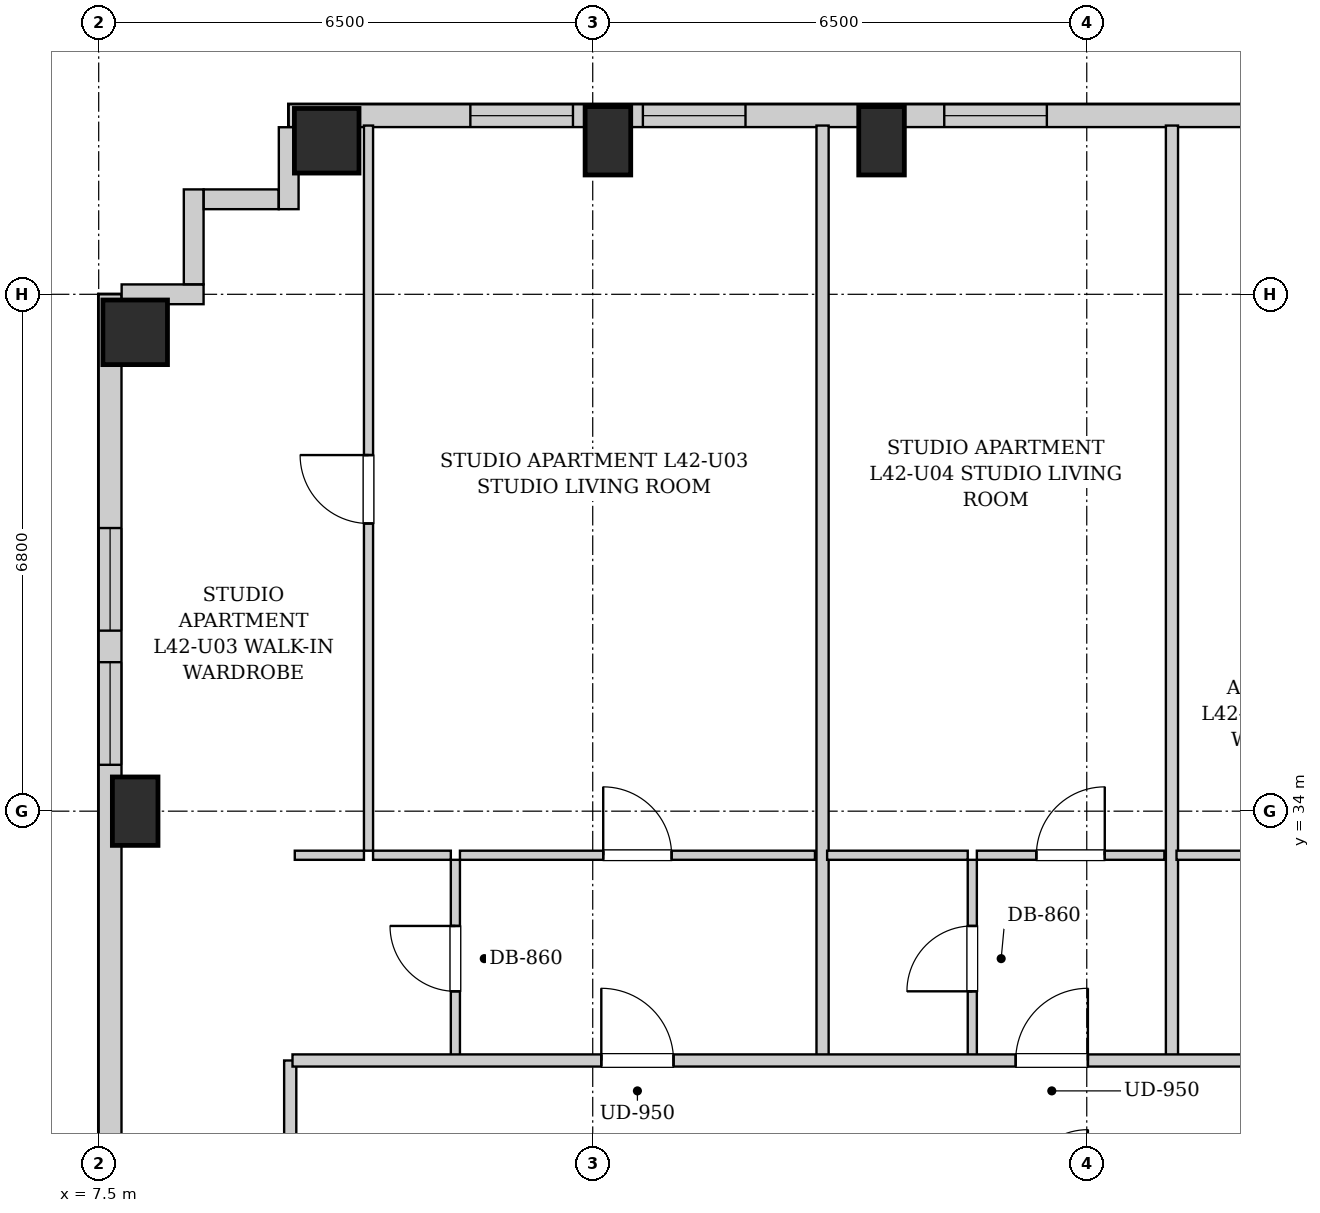
"""IFC4 building model, lengths in metres.
Left out: names, types, materials, properties, quantities, classifications, styles, units other than length and angle.
Written with IfcOpenShell. Run it as: python <this file> out.ifc"""

import sys

from ifc_helpers import new_model, si_unit, direction, frame, frame_2d, origin, origin_2d, place, context, subcontext, project, spatial, rectangle, extrude, element, fill, save


model = new_model("IFC4")
c1 = context("Model", 3, precision=1e-05, world=origin(), true_north=direction((0.0, 1.0)))
c2 = subcontext(c1, "Body", "Model", "MODEL_VIEW")
j1 = project(units=[si_unit("LENGTHUNIT", "METRE"), si_unit("PLANEANGLEUNIT", "RADIAN")], contexts=[c1])
p1 = place(None, origin())
s1 = spatial("IfcSite", under=j1, at=p1, CompositionType="ELEMENT")
p2 = place(p1, origin())
s2 = spatial("IfcBuilding", under=s1, at=p2, CompositionType="ELEMENT")
p3 = place(p2, frame((0.0, 0.0, 147.15)))
s3 = spatial("IfcBuildingStorey", under=s2, at=p3, CompositionType="ELEMENT", Elevation=147.15)
p4 = place(p3, frame((10.5, 42.82, 0.0), z_axis=(0.0, 0.0, 1.0), x_axis=(1.0, 0.0, 0.0)))
e1 = element("IfcColumn", 1, at=p4, inside=s3, PredefinedType="COLUMN", context=c2, shape_type="SweptSolid", body=[
    extrude(rectangle(XDim=0.85, YDim=0.85, at=origin_2d()), origin(), (0.0, 0.0, 1.0), 3.25),
])
for number, where, z_axis, x_axis in (
    (2, (14.2, 42.82, 0.0), (0.0, 0.0, 1.0), (1.0, 0.0, 0.0)),
    (3, (17.8, 42.82, 0.0), (0.0, 0.0, 1.0), (1.0, 0.0, 0.0)),
    (4, (7.98, 34.0, 0.0), (0.0, 0.0, 1.0), (1.0, 0.0, 0.0)),
):
    element("IfcColumn", number, at=place(p3, frame(where, z_axis=z_axis, x_axis=x_axis)), inside=s3, PredefinedType="COLUMN", context=c2, shape_type="SweptSolid", body=[
        extrude(rectangle(XDim=0.6, YDim=0.9, at=origin_2d()), origin(), (0.0, 0.0, 1.0), 3.25),
    ])
p5 = place(p3, frame((7.98, 40.3, 0.0), z_axis=(0.0, 0.0, 1.0), x_axis=(1.0, 0.0, 0.0)))
e5 = element("IfcColumn", 5, at=p5, inside=s3, PredefinedType="COLUMN", context=c2, shape_type="SweptSolid", body=[
    extrude(rectangle(XDim=0.85, YDim=0.85, at=origin_2d()), origin(), (0.0, 0.0, 1.0), 3.25),
])
p6 = place(p3, frame((10.0, 43.15, 0.0), z_axis=(0.0, 0.0, 1.0), x_axis=(1.0, 0.0, 0.0)))
e6 = element("IfcWall", 6, at=p6, inside=s3, PredefinedType="SOLIDWALL", context=c2, shape_type="SweptSolid", body=[
    extrude(rectangle(XDim=19.5, YDim=0.3, at=frame_2d((9.75, 0.0))), origin(), (0.0, 0.0, 1.0), 2.99),
])
p7 = place(p6, frame((2.39, 0.0, 0.55)))
e7 = element("IfcOpeningElement", 7, at=p7, cuts=e6, PredefinedType="OPENING", context=c2, shape_type="SweptSolid", body=[
    extrude(rectangle(XDim=1.35, YDim=1.2, at=frame_2d((0.675, 0.6))), frame((0.0, 0.16, 0.0), z_axis=(0.0, -1.0, 0.0), x_axis=(1.0, 0.0, 0.0)), (0.0, 0.0, 1.0), 0.32),
])
p8 = place(p6, frame((4.66, 0.0, 0.55)))
e8 = element("IfcOpeningElement", 8, at=p8, cuts=e6, PredefinedType="OPENING", context=c2, shape_type="SweptSolid", body=[
    extrude(rectangle(XDim=1.35, YDim=1.2, at=frame_2d((0.675, 0.6))), frame((0.0, 0.16, 0.0), z_axis=(0.0, -1.0, 0.0), x_axis=(1.0, 0.0, 0.0)), (0.0, 0.0, 1.0), 0.32),
])
p9 = place(p6, frame((8.625, 0.0, 0.55)))
e9 = element("IfcOpeningElement", 9, at=p9, cuts=e6, PredefinedType="OPENING", context=c2, shape_type="SweptSolid", body=[
    extrude(rectangle(XDim=1.35, YDim=1.2, at=frame_2d((0.675, 0.6))), frame((0.0, 0.16, 0.0), z_axis=(0.0, -1.0, 0.0), x_axis=(1.0, 0.0, 0.0)), (0.0, 0.0, 1.0), 0.32),
])
p10 = place(p6, frame((17.5, 0.0, 0.55)))
e10 = element("IfcOpeningElement", 10, at=p10, cuts=e6, PredefinedType="OPENING", context=c2, shape_type="SweptSolid", body=[
    extrude(rectangle(XDim=1.35, YDim=1.2, at=frame_2d((0.675, 0.6))), frame((0.0, 0.16, 0.0), z_axis=(0.0, -1.0, 0.0), x_axis=(1.0, 0.0, 0.0)), (0.0, 0.0, 1.0), 0.32),
])
p11 = place(p3, frame((7.65, 6.3, 0.0), z_axis=(0.0, 0.0, 1.0), x_axis=(0.0, 1.0, 0.0)))
e11 = element("IfcWall", 11, at=p11, inside=s3, PredefinedType="SOLIDWALL", context=c2, shape_type="SweptSolid", body=[
    extrude(rectangle(XDim=34.5, YDim=0.3, at=frame_2d((17.25, 0.0))), origin(), (0.0, 0.0, 1.0), 2.99),
])
p12 = place(p11, frame((1.575, 0.0, 0.55)))
e12 = element("IfcOpeningElement", 12, at=p12, cuts=e11, PredefinedType="OPENING", context=c2, shape_type="SweptSolid", body=[
    extrude(rectangle(XDim=1.35, YDim=1.2, at=frame_2d((0.675, 0.6))), frame((0.0, 0.16, 0.0), z_axis=(0.0, -1.0, 0.0), x_axis=(1.0, 0.0, 0.0)), (0.0, 0.0, 1.0), 0.32),
])
p13 = place(p11, frame((30.075, 0.0, 0.55)))
e13 = element("IfcOpeningElement", 13, at=p13, cuts=e11, PredefinedType="OPENING", context=c2, shape_type="SweptSolid", body=[
    extrude(rectangle(XDim=1.35, YDim=1.2, at=frame_2d((0.675, 0.6))), frame((0.0, 0.16, 0.0), z_axis=(0.0, -1.0, 0.0), x_axis=(1.0, 0.0, 0.0)), (0.0, 0.0, 1.0), 0.32),
])
p14 = place(p11, frame((28.31, 0.0, 0.55)))
e14 = element("IfcOpeningElement", 14, at=p14, cuts=e11, PredefinedType="OPENING", context=c2, shape_type="SweptSolid", body=[
    extrude(rectangle(XDim=1.35, YDim=1.2, at=frame_2d((0.675, 0.6))), frame((0.0, 0.16, 0.0), z_axis=(0.0, -1.0, 0.0), x_axis=(1.0, 0.0, 0.0)), (0.0, 0.0, 1.0), 0.32),
])
p15 = place(p11, frame((11.175, 0.0, 0.55)))
e15 = element("IfcOpeningElement", 15, at=p15, cuts=e11, PredefinedType="OPENING", context=c2, shape_type="SweptSolid", body=[
    extrude(rectangle(XDim=1.35, YDim=1.2, at=frame_2d((0.675, 0.6))), frame((0.0, 0.16, 0.0), z_axis=(0.0, -1.0, 0.0), x_axis=(1.0, 0.0, 0.0)), (0.0, 0.0, 1.0), 0.32),
])
p16 = place(p11, frame((9.31, 0.0, 0.55)))
e16 = element("IfcOpeningElement", 16, at=p16, cuts=e11, PredefinedType="OPENING", context=c2, shape_type="SweptSolid", body=[
    extrude(rectangle(XDim=1.35, YDim=1.2, at=frame_2d((0.675, 0.6))), frame((0.0, 0.16, 0.0), z_axis=(0.0, -1.0, 0.0), x_axis=(1.0, 0.0, 0.0)), (0.0, 0.0, 1.0), 0.32),
])
p17 = place(p11, frame((18.2, 0.0, 0.55)))
e17 = element("IfcOpeningElement", 17, at=p17, cuts=e11, PredefinedType="OPENING", context=c2, shape_type="SweptSolid", body=[
    extrude(rectangle(XDim=1.35, YDim=1.2, at=frame_2d((0.675, 0.6))), frame((0.0, 0.16, 0.0), z_axis=(0.0, -1.0, 0.0), x_axis=(1.0, 0.0, 0.0)), (0.0, 0.0, 1.0), 0.32),
])
p18 = place(p11, frame((19.81, 0.0, 0.55)))
e18 = element("IfcOpeningElement", 18, at=p18, cuts=e11, PredefinedType="OPENING", context=c2, shape_type="SweptSolid", body=[
    extrude(rectangle(XDim=1.35, YDim=1.2, at=frame_2d((0.675, 0.6))), frame((0.0, 0.16, 0.0), z_axis=(0.0, -1.0, 0.0), x_axis=(1.0, 0.0, 0.0)), (0.0, 0.0, 1.0), 0.32),
])
p19 = place(p3, frame((7.802, 40.8, 0.0), z_axis=(0.0, 0.0, 1.0), x_axis=(1.0, 0.0, 0.0)))
e19 = element("IfcWall", 19, at=p19, inside=s3, PredefinedType="SOLIDWALL", context=c2, shape_type="SweptSolid", body=[
    extrude(rectangle(XDim=1.078, YDim=0.26, at=frame_2d((0.539, 0.0))), origin(), (0.0, 0.0, 1.0), 2.99),
])
p20 = place(p3, frame((8.75, 40.932, 0.0), z_axis=(0.0, 0.0, 1.0), x_axis=(0.0, 1.0, 0.0)))
e20 = element("IfcWall", 20, at=p20, inside=s3, PredefinedType="SOLIDWALL", context=c2, shape_type="SweptSolid", body=[
    extrude(rectangle(XDim=1.248, YDim=0.26, at=frame_2d((0.624, 0.0))), origin(), (0.0, 0.0, 1.0), 2.99),
])
p21 = place(p3, frame((8.882, 42.05, 0.0), z_axis=(0.0, 0.0, 1.0), x_axis=(1.0, 0.0, 0.0)))
e21 = element("IfcWall", 21, at=p21, inside=s3, PredefinedType="SOLIDWALL", context=c2, shape_type="SweptSolid", body=[
    extrude(rectangle(XDim=0.986, YDim=0.26, at=frame_2d((0.493, 0.0))), origin(), (0.0, 0.0, 1.0), 2.99),
])
p22 = place(p3, frame((10.0, 41.92, 0.0), z_axis=(0.0, 0.0, 1.0), x_axis=(0.0, 1.0, 0.0)))
e22 = element("IfcWall", 22, at=p22, inside=s3, PredefinedType="SOLIDWALL", context=c2, shape_type="SweptSolid", body=[
    extrude(rectangle(XDim=1.078, YDim=0.26, at=frame_2d((0.539, 0.0))), origin(), (0.0, 0.0, 1.0), 2.99),
])
p23 = place(p3, frame((10.02, 28.98, 0.0), z_axis=(0.0, 0.0, 1.0), x_axis=(0.0, 1.0, 0.0)))
e23 = element("IfcWall", 23, at=p23, inside=s3, PredefinedType="PARTITIONING", context=c2, shape_type="SweptSolid", body=[
    extrude(rectangle(XDim=1.74, YDim=0.16, at=frame_2d((0.87, 0.0))), origin(), (0.0, 0.0, 1.0), 2.99),
])
p24 = place(p3, frame((12.193, 30.76, 0.0), z_axis=(0.0, 0.0, 1.0), x_axis=(0.0, 1.0, 0.0)))
e24 = element("IfcWall", 24, at=p24, inside=s3, PredefinedType="PARTITIONING", context=c2, shape_type="SweptSolid", body=[
    extrude(rectangle(XDim=2.6, YDim=0.12, at=frame_2d((1.3, 0.0))), origin(), (0.0, 0.0, 1.0), 2.99),
])
p25 = place(p24, frame((0.87, 0.0, 0.0)))
e25 = element("IfcOpeningElement", 25, at=p25, cuts=e24, PredefinedType="OPENING", context=c2, shape_type="SweptSolid", body=[
    extrude(rectangle(XDim=0.86, YDim=2.05, at=frame_2d((0.43, 1.025))), frame((0.0, 0.07, 0.0), z_axis=(0.0, -1.0, 0.0), x_axis=(1.0, 0.0, 0.0)), (0.0, 0.0, 1.0), 0.14),
])
p26 = place(p3, frame((10.08, 33.42, 0.0), z_axis=(0.0, 0.0, 1.0), x_axis=(1.0, 0.0, 0.0)))
e26 = element("IfcWall", 26, at=p26, inside=s3, PredefinedType="PARTITIONING", context=c2, shape_type="SweptSolid", body=[
    extrude(rectangle(XDim=0.91, YDim=0.12, at=frame_2d((0.455, 0.0))), origin(), (0.0, 0.0, 1.0), 2.99),
])
p27 = place(p3, frame((11.11, 33.42, 0.0), z_axis=(0.0, 0.0, 1.0), x_axis=(1.0, 0.0, 0.0)))
e27 = element("IfcWall", 27, at=p27, inside=s3, PredefinedType="PARTITIONING", context=c2, shape_type="SweptSolid", body=[
    extrude(rectangle(XDim=1.023, YDim=0.12, at=frame_2d((0.511, 0.0))), origin(), (0.0, 0.0, 1.0), 2.99),
])
p28 = place(p3, frame((12.253, 33.42, 0.0), z_axis=(0.0, 0.0, 1.0), x_axis=(1.0, 0.0, 0.0)))
e28 = element("IfcWall", 28, at=p28, inside=s3, PredefinedType="PARTITIONING", context=c2, shape_type="SweptSolid", body=[
    extrude(rectangle(XDim=4.671, YDim=0.12, at=frame_2d((2.335, 0.0))), origin(), (0.0, 0.0, 1.0), 2.99),
])
p29 = place(p28, frame((1.885, 0.0, 0.0)))
e29 = element("IfcOpeningElement", 29, at=p29, cuts=e28, PredefinedType="OPENING", context=c2, shape_type="SweptSolid", body=[
    extrude(rectangle(XDim=0.9, YDim=2.05, at=frame_2d((0.45, 1.025))), frame((0.0, 0.07, 0.0), z_axis=(0.0, -1.0, 0.0), x_axis=(1.0, 0.0, 0.0)), (0.0, 0.0, 1.0), 0.14),
])
p30 = place(p3, frame((11.05, 33.48, 0.0), z_axis=(0.0, 0.0, 1.0), x_axis=(0.0, 1.0, 0.0)))
e30 = element("IfcWall", 30, at=p30, inside=s3, PredefinedType="PARTITIONING", context=c2, shape_type="SweptSolid", body=[
    extrude(rectangle(XDim=9.54, YDim=0.12, at=frame_2d((4.77, 0.0))), origin(), (0.0, 0.0, 1.0), 2.99),
])
p31 = place(p30, frame((4.305, 0.0, 0.0)))
e31 = element("IfcOpeningElement", 31, at=p31, cuts=e30, PredefinedType="OPENING", context=c2, shape_type="SweptSolid", body=[
    extrude(rectangle(XDim=0.9, YDim=2.05, at=frame_2d((0.45, 1.025))), frame((0.0, 0.07, 0.0), z_axis=(0.0, -1.0, 0.0), x_axis=(1.0, 0.0, 0.0)), (0.0, 0.0, 1.0), 0.14),
])
p32 = place(p3, frame((17.024, 30.76, 0.0), z_axis=(0.0, 0.0, 1.0), x_axis=(0.0, 1.0, 0.0)))
e32 = element("IfcWall", 32, at=p32, inside=s3, PredefinedType="PARTITIONING", context=c2, shape_type="SweptSolid", body=[
    extrude(rectangle(XDim=12.26, YDim=0.16, at=frame_2d((6.13, 0.0))), origin(), (0.0, 0.0, 1.0), 2.99),
])
p33 = place(p3, frame((18.994, 30.76, 0.0), z_axis=(0.0, 0.0, 1.0), x_axis=(0.0, 1.0, 0.0)))
e33 = element("IfcWall", 33, at=p33, inside=s3, PredefinedType="PARTITIONING", context=c2, shape_type="SweptSolid", body=[
    extrude(rectangle(XDim=2.6, YDim=0.12, at=frame_2d((1.3, 0.0))), origin(), (0.0, 0.0, 1.0), 2.99),
])
p34 = place(p33, frame((0.87, 0.0, 0.0)))
e34 = element("IfcOpeningElement", 34, at=p34, cuts=e33, PredefinedType="OPENING", context=c2, shape_type="SweptSolid", body=[
    extrude(rectangle(XDim=0.86, YDim=2.05, at=frame_2d((0.43, 1.025))), frame((0.0, 0.07, 0.0), z_axis=(0.0, -1.0, 0.0), x_axis=(1.0, 0.0, 0.0)), (0.0, 0.0, 1.0), 0.14),
])
p35 = place(p3, frame((17.084, 33.42, 0.0), z_axis=(0.0, 0.0, 1.0), x_axis=(1.0, 0.0, 0.0)))
e35 = element("IfcWall", 35, at=p35, inside=s3, PredefinedType="PARTITIONING", context=c2, shape_type="SweptSolid", body=[
    extrude(rectangle(XDim=1.85, YDim=0.12, at=frame_2d((0.925, 0.0))), origin(), (0.0, 0.0, 1.0), 2.99),
])
p36 = place(p3, frame((19.054, 33.42, 0.0), z_axis=(0.0, 0.0, 1.0), x_axis=(1.0, 0.0, 0.0)))
e36 = element("IfcWall", 36, at=p36, inside=s3, PredefinedType="PARTITIONING", context=c2, shape_type="SweptSolid", body=[
    extrude(rectangle(XDim=2.467, YDim=0.12, at=frame_2d((1.233, 0.0))), origin(), (0.0, 0.0, 1.0), 2.99),
])
p37 = place(p36, frame((0.783, 0.0, 0.0)))
e37 = element("IfcOpeningElement", 37, at=p37, cuts=e36, PredefinedType="OPENING", context=c2, shape_type="SweptSolid", body=[
    extrude(rectangle(XDim=0.9, YDim=2.05, at=frame_2d((0.45, 1.025))), frame((0.0, 0.07, 0.0), z_axis=(0.0, -1.0, 0.0), x_axis=(1.0, 0.0, 0.0)), (0.0, 0.0, 1.0), 0.14),
])
p38 = place(p3, frame((21.621, 30.76, 0.0), z_axis=(0.0, 0.0, 1.0), x_axis=(0.0, 1.0, 0.0)))
e38 = element("IfcWall", 38, at=p38, inside=s3, PredefinedType="PARTITIONING", context=c2, shape_type="SweptSolid", body=[
    extrude(rectangle(XDim=12.26, YDim=0.16, at=frame_2d((6.13, 0.0))), origin(), (0.0, 0.0, 1.0), 2.99),
])
p39 = place(p3, frame((21.681, 33.42, 0.0), z_axis=(0.0, 0.0, 1.0), x_axis=(1.0, 0.0, 0.0)))
e39 = element("IfcWall", 39, at=p39, inside=s3, PredefinedType="PARTITIONING", context=c2, shape_type="SweptSolid", body=[
    extrude(rectangle(XDim=2.4, YDim=0.12, at=frame_2d((1.2, 0.0))), origin(), (0.0, 0.0, 1.0), 2.99),
])
p40 = place(p3, frame((10.05, 30.72, 0.0), z_axis=(0.0, 0.0, 1.0), x_axis=(1.0, 0.0, 0.0)))
e40 = element("IfcWall", 40, at=p40, inside=s3, PredefinedType="PARTITIONING", context=c2, shape_type="SweptSolid", body=[
    extrude(rectangle(XDim=27.7, YDim=0.16, at=frame_2d((13.85, 0.0))), origin(), (0.0, 0.0, 1.0), 2.99),
])
p41 = place(p40, frame((4.063, 0.0, 0.0)))
e41 = element("IfcOpeningElement", 41, at=p41, cuts=e40, PredefinedType="OPENING", context=c2, shape_type="SweptSolid", body=[
    extrude(rectangle(XDim=0.95, YDim=2.1, at=frame_2d((0.475, 1.05))), frame((0.0, 0.09, 0.0), z_axis=(0.0, -1.0, 0.0), x_axis=(1.0, 0.0, 0.0)), (0.0, 0.0, 1.0), 0.18),
])
p42 = place(p40, frame((9.515, 0.0, 0.0)))
e42 = element("IfcOpeningElement", 42, at=p42, cuts=e40, PredefinedType="OPENING", context=c2, shape_type="SweptSolid", body=[
    extrude(rectangle(XDim=0.95, YDim=2.1, at=frame_2d((0.475, 1.05))), frame((0.0, 0.09, 0.0), z_axis=(0.0, -1.0, 0.0), x_axis=(1.0, 0.0, 0.0)), (0.0, 0.0, 1.0), 0.18),
])
p43 = place(p40, frame((15.896, 0.0, 0.0)))
e43 = element("IfcOpeningElement", 43, at=p43, cuts=e40, PredefinedType="OPENING", context=c2, shape_type="SweptSolid", body=[
    extrude(rectangle(XDim=0.95, YDim=2.1, at=frame_2d((0.475, 1.05))), frame((0.0, 0.09, 0.0), z_axis=(0.0, -1.0, 0.0), x_axis=(1.0, 0.0, 0.0)), (0.0, 0.0, 1.0), 0.18),
])
p44 = place(p40, frame((25.925, 0.0, 0.0)))
e44 = element("IfcOpeningElement", 44, at=p44, cuts=e40, PredefinedType="OPENING", context=c2, shape_type="SweptSolid", body=[
    extrude(rectangle(XDim=0.95, YDim=2.1, at=frame_2d((0.475, 1.05))), frame((0.0, 0.09, 0.0), z_axis=(0.0, -1.0, 0.0), x_axis=(1.0, 0.0, 0.0)), (0.0, 0.0, 1.0), 0.18),
])
p45 = place(p25, origin())
e45 = element("IfcDoor", 45, at=p45, inside=s3, OperationType="SINGLE_SWING_RIGHT", PredefinedType="DOOR", context=c2, shape_type="SweptSolid", body=[
    extrude(rectangle(XDim=0.86, YDim=2.05, at=frame_2d((0.43, 1.025))), frame((0.0, 0.025, 0.0), z_axis=(0.0, -1.0, 0.0), x_axis=(1.0, 0.0, 0.0)), (0.0, 0.0, 1.0), 0.05),
])
fill(e25, e45)
p46 = place(p29, origin())
e46 = element("IfcDoor", 46, at=p46, inside=s3, OperationType="SINGLE_SWING_LEFT", PredefinedType="DOOR", context=c2, shape_type="SweptSolid", body=[
    extrude(rectangle(XDim=0.9, YDim=2.05, at=frame_2d((0.45, 1.025))), frame((0.0, 0.025, 0.0), z_axis=(0.0, -1.0, 0.0), x_axis=(1.0, 0.0, 0.0)), (0.0, 0.0, 1.0), 0.05),
])
fill(e29, e46)
p47 = place(p31, origin())
e47 = element("IfcDoor", 47, at=p47, inside=s3, OperationType="SINGLE_SWING_RIGHT", PredefinedType="DOOR", context=c2, shape_type="SweptSolid", body=[
    extrude(rectangle(XDim=0.9, YDim=2.05, at=frame_2d((0.45, 1.025))), frame((0.0, 0.025, 0.0), z_axis=(0.0, -1.0, 0.0), x_axis=(1.0, 0.0, 0.0)), (0.0, 0.0, 1.0), 0.05),
])
fill(e31, e47)
p48 = place(p34, origin())
e48 = element("IfcDoor", 48, at=p48, inside=s3, OperationType="SINGLE_SWING_LEFT", PredefinedType="DOOR", context=c2, shape_type="SweptSolid", body=[
    extrude(rectangle(XDim=0.86, YDim=2.05, at=frame_2d((0.43, 1.025))), frame((0.0, 0.025, 0.0), z_axis=(0.0, -1.0, 0.0), x_axis=(1.0, 0.0, 0.0)), (0.0, 0.0, 1.0), 0.05),
])
fill(e34, e48)
p49 = place(p37, origin())
e49 = element("IfcDoor", 49, at=p49, inside=s3, OperationType="SINGLE_SWING_RIGHT", PredefinedType="DOOR", context=c2, shape_type="SweptSolid", body=[
    extrude(rectangle(XDim=0.9, YDim=2.05, at=frame_2d((0.45, 1.025))), frame((0.0, 0.025, 0.0), z_axis=(0.0, -1.0, 0.0), x_axis=(1.0, 0.0, 0.0)), (0.0, 0.0, 1.0), 0.05),
])
fill(e37, e49)
p50 = place(p41, origin())
e50 = element("IfcDoor", 50, at=p50, inside=s3, OperationType="SINGLE_SWING_LEFT", PredefinedType="DOOR", context=c2, shape_type="SweptSolid", body=[
    extrude(rectangle(XDim=0.95, YDim=2.1, at=frame_2d((0.475, 1.05))), frame((0.0, 0.025, 0.0), z_axis=(0.0, -1.0, 0.0), x_axis=(1.0, 0.0, 0.0)), (0.0, 0.0, 1.0), 0.05),
])
fill(e41, e50)
p51 = place(p42, origin())
e51 = element("IfcDoor", 51, at=p51, inside=s3, OperationType="SINGLE_SWING_RIGHT", PredefinedType="DOOR", context=c2, shape_type="SweptSolid", body=[
    extrude(rectangle(XDim=0.95, YDim=2.1, at=frame_2d((0.475, 1.05))), frame((0.0, 0.025, 0.0), z_axis=(0.0, -1.0, 0.0), x_axis=(1.0, 0.0, 0.0)), (0.0, 0.0, 1.0), 0.05),
])
fill(e42, e51)
p52 = place(p13, origin())
e52 = element("IfcWindow", 52, at=p52, inside=s3, PartitioningType="SINGLE_PANEL", PredefinedType="WINDOW", context=c2, shape_type="SweptSolid", body=[
    extrude(rectangle(XDim=1.35, YDim=1.2, at=frame_2d((0.675, 0.6))), frame((0.0, 0.03, 0.0), z_axis=(0.0, -1.0, 0.0), x_axis=(1.0, 0.0, 0.0)), (0.0, 0.0, 1.0), 0.06),
])
fill(e13, e52)
p53 = place(p14, origin())
e53 = element("IfcWindow", 53, at=p53, inside=s3, PartitioningType="SINGLE_PANEL", PredefinedType="WINDOW", context=c2, shape_type="SweptSolid", body=[
    extrude(rectangle(XDim=1.35, YDim=1.2, at=frame_2d((0.675, 0.6))), frame((0.0, 0.03, 0.0), z_axis=(0.0, -1.0, 0.0), x_axis=(1.0, 0.0, 0.0)), (0.0, 0.0, 1.0), 0.06),
])
fill(e14, e53)
p54 = place(p7, origin())
e54 = element("IfcWindow", 54, at=p54, inside=s3, PartitioningType="SINGLE_PANEL", PredefinedType="WINDOW", context=c2, shape_type="SweptSolid", body=[
    extrude(rectangle(XDim=1.35, YDim=1.2, at=frame_2d((0.675, 0.6))), frame((0.0, 0.03, 0.0), z_axis=(0.0, -1.0, 0.0), x_axis=(1.0, 0.0, 0.0)), (0.0, 0.0, 1.0), 0.06),
])
fill(e7, e54)
p55 = place(p8, origin())
e55 = element("IfcWindow", 55, at=p55, inside=s3, PartitioningType="SINGLE_PANEL", PredefinedType="WINDOW", context=c2, shape_type="SweptSolid", body=[
    extrude(rectangle(XDim=1.35, YDim=1.2, at=frame_2d((0.675, 0.6))), frame((0.0, 0.03, 0.0), z_axis=(0.0, -1.0, 0.0), x_axis=(1.0, 0.0, 0.0)), (0.0, 0.0, 1.0), 0.06),
])
fill(e8, e55)
p56 = place(p9, origin())
e56 = element("IfcWindow", 56, at=p56, inside=s3, PartitioningType="SINGLE_PANEL", PredefinedType="WINDOW", context=c2, shape_type="SweptSolid", body=[
    extrude(rectangle(XDim=1.35, YDim=1.2, at=frame_2d((0.675, 0.6))), frame((0.0, 0.03, 0.0), z_axis=(0.0, -1.0, 0.0), x_axis=(1.0, 0.0, 0.0)), (0.0, 0.0, 1.0), 0.06),
])
fill(e9, e56)
save(model, sys.argv[1])
